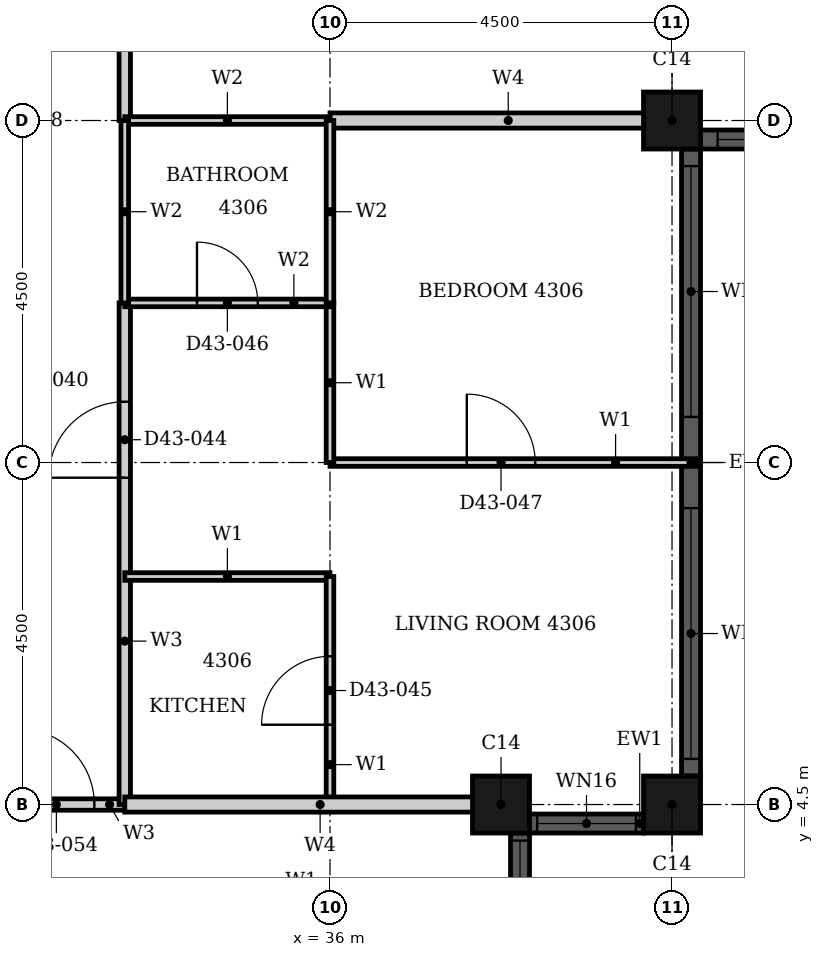
"""IFC4 building model, lengths in metres.
Left out: names, types, materials, properties, quantities, classifications, styles, units other than length and angle.
Written with IfcOpenShell. Run it as: python <this file> out.ifc"""

import sys

from ifc_helpers import new_model, si_unit, direction, frame, frame_2d, origin, origin_2d, place, context, subcontext, project, spatial, rectangle, hollow_rectangle, extrude, element, fill, save


model = new_model("IFC4")
c1 = context("Model", 3, precision=1e-05, world=origin(), true_north=direction((0.0, 1.0)))
c2 = subcontext(c1, "Body", "Model", "MODEL_VIEW")
j1 = project(units=[si_unit("LENGTHUNIT", "METRE"), si_unit("PLANEANGLEUNIT", "RADIAN")], contexts=[c1])
p1 = place(None, origin())
s1 = spatial("IfcSite", under=j1, at=p1, CompositionType="ELEMENT")
p2 = place(p1, origin())
s2 = spatial("IfcBuilding", under=s1, at=p2, CompositionType="ELEMENT")
p3 = place(p2, frame((0.0, 0.0, 172.8)))
s3 = spatial("IfcBuildingStorey", under=s2, at=p3, CompositionType="ELEMENT", Elevation=172.8)
for number, where, z_axis, x_axis in (
    (1, (38.25, 4.5, 0.0), (0.0, 0.0, 1.0), (1.0, 0.0, 0.0)),
    (2, (40.5, 4.5, 0.0), (0.0, 0.0, 1.0), (1.0, 0.0, 0.0)),
    (3, (40.5, 13.5, 0.0), (0.0, 0.0, 1.0), (1.0, 0.0, 0.0)),
):
    element("IfcColumn", number, at=place(p3, frame(where, z_axis=z_axis, x_axis=x_axis)), inside=s3, PredefinedType="COLUMN", context=c2, shape_type="SweptSolid", body=[
        extrude(hollow_rectangle(XDim=0.75, YDim=0.75, WallThickness=0.024, at=origin_2d()), origin(), (0.0, 0.0, 1.0), 3.7),
    ])
p4 = place(p3, frame((38.5, 2.625, 0.0), z_axis=(0.0, 0.0, 1.0), x_axis=(0.0, 1.0, 0.0)))
e4 = element("IfcWall", 4, at=p4, inside=s3, PredefinedType="SOLIDWALL", context=c2, shape_type="SweptSolid", body=[
    extrude(rectangle(XDim=1.5, YDim=0.25, at=frame_2d((0.75, 0.0))), origin(), (0.0, 0.0, 1.0), 3.7),
])
p5 = place(p4, frame((0.1, 0.0, 0.9)))
e5 = element("IfcOpeningElement", 5, at=p5, cuts=e4, PredefinedType="OPENING", context=c2, shape_type="SweptSolid", body=[
    extrude(rectangle(XDim=1.3, YDim=1.85, at=frame_2d((0.65, 0.925))), frame((0.0, 0.135, 0.0), z_axis=(0.0, -1.0, 0.0), x_axis=(1.0, 0.0, 0.0)), (0.0, 0.0, 1.0), 0.27),
])
p6 = place(p3, frame((38.625, 4.25, 0.0), z_axis=(0.0, 0.0, 1.0), x_axis=(1.0, 0.0, 0.0)))
e6 = element("IfcWall", 6, at=p6, inside=s3, PredefinedType="SOLIDWALL", context=c2, shape_type="SweptSolid", body=[
    extrude(rectangle(XDim=1.5, YDim=0.25, at=frame_2d((0.75, 0.0))), origin(), (0.0, 0.0, 1.0), 3.7),
])
p7 = place(p6, frame((0.1, 0.0, 0.9)))
e7 = element("IfcOpeningElement", 7, at=p7, cuts=e6, PredefinedType="OPENING", context=c2, shape_type="SweptSolid", body=[
    extrude(rectangle(XDim=1.3, YDim=1.85, at=frame_2d((0.65, 0.925))), frame((0.0, 0.135, 0.0), z_axis=(0.0, -1.0, 0.0), x_axis=(1.0, 0.0, 0.0)), (0.0, 0.0, 1.0), 0.27),
])
p8 = place(p3, frame((40.75, 4.875, 0.0), z_axis=(0.0, 0.0, 1.0), x_axis=(0.0, 1.0, 0.0)))
e8 = element("IfcWall", 8, at=p8, inside=s3, PredefinedType="SOLIDWALL", context=c2, shape_type="SweptSolid", body=[
    extrude(rectangle(XDim=8.25, YDim=0.25, at=frame_2d((4.125, 0.0))), origin(), (0.0, 0.0, 1.0), 3.7),
])
p9 = place(p8, frame((0.225, 0.0, 0.45)))
e9 = element("IfcOpeningElement", 9, at=p9, cuts=e8, PredefinedType="OPENING", context=c2, shape_type="SweptSolid", body=[
    extrude(rectangle(XDim=3.3, YDim=2.3, at=frame_2d((1.65, 1.15))), frame((0.0, 0.135, 0.0), z_axis=(0.0, -1.0, 0.0), x_axis=(1.0, 0.0, 0.0)), (0.0, 0.0, 1.0), 0.27),
])
p10 = place(p8, frame((4.725, 0.0, 0.45)))
e10 = element("IfcOpeningElement", 10, at=p10, cuts=e8, PredefinedType="OPENING", context=c2, shape_type="SweptSolid", body=[
    extrude(rectangle(XDim=3.3, YDim=2.3, at=frame_2d((1.65, 1.15))), frame((0.0, 0.135, 0.0), z_axis=(0.0, -1.0, 0.0), x_axis=(1.0, 0.0, 0.0)), (0.0, 0.0, 1.0), 0.27),
])
p11 = place(p3, frame((40.875, 13.25, 0.0), z_axis=(0.0, 0.0, 1.0), x_axis=(1.0, 0.0, 0.0)))
e11 = element("IfcWall", 11, at=p11, inside=s3, PredefinedType="SOLIDWALL", context=c2, shape_type="SweptSolid", body=[
    extrude(rectangle(XDim=3.75, YDim=0.25, at=frame_2d((1.875, 0.0))), origin(), (0.0, 0.0, 1.0), 3.7),
])
p12 = place(p11, frame((0.225, 0.0, 0.45)))
e12 = element("IfcOpeningElement", 12, at=p12, cuts=e11, PredefinedType="OPENING", context=c2, shape_type="SweptSolid", body=[
    extrude(rectangle(XDim=3.3, YDim=2.3, at=frame_2d((1.65, 1.15))), frame((0.0, 0.135, 0.0), z_axis=(0.0, -1.0, 0.0), x_axis=(1.0, 0.0, 0.0)), (0.0, 0.0, 1.0), 0.27),
])
p13 = place(p3, frame((31.5, 4.5, 0.0), z_axis=(0.0, 0.0, 1.0), x_axis=(1.0, 0.0, 0.0)))
e13 = element("IfcWall", 13, at=p13, inside=s3, PredefinedType="PARTITIONING", context=c2, shape_type="SweptSolid", body=[
    extrude(rectangle(XDim=1.8, YDim=0.15, at=frame_2d((0.9, 0.0))), origin(), (0.0, 0.0, 1.0), 3.4),
])
p14 = place(p13, frame((0.4, 0.0, 0.0)))
e14 = element("IfcOpeningElement", 14, at=p14, cuts=e13, PredefinedType="OPENING", context=c2, shape_type="SweptSolid", body=[
    extrude(rectangle(XDim=1.0, YDim=2.2, at=frame_2d((0.5, 1.1))), frame((0.0, 0.085, 0.0), z_axis=(0.0, -1.0, 0.0), x_axis=(1.0, 0.0, 0.0)), (0.0, 0.0, 1.0), 0.17),
])
p15 = place(p3, frame((33.3, 4.5, 0.0), z_axis=(0.0, 0.0, 1.0), x_axis=(0.0, 1.0, 0.0)))
e15 = element("IfcWall", 15, at=p15, inside=s3, PredefinedType="PARTITIONING", context=c2, shape_type="SweptSolid", body=[
    extrude(rectangle(XDim=6.6, YDim=0.15, at=frame_2d((3.3, 0.0))), origin(), (0.0, 0.0, 1.0), 3.4),
])
p16 = place(p15, frame((4.3, 0.0, 0.0)))
e16 = element("IfcOpeningElement", 16, at=p16, cuts=e15, PredefinedType="OPENING", context=c2, shape_type="SweptSolid", body=[
    extrude(rectangle(XDim=1.0, YDim=2.2, at=frame_2d((0.5, 1.1))), frame((0.0, 0.085, 0.0), z_axis=(0.0, -1.0, 0.0), x_axis=(1.0, 0.0, 0.0)), (0.0, 0.0, 1.0), 0.17),
])
p17 = place(p3, frame((33.3, 13.501, 0.0), z_axis=(0.0, 0.0, 1.0), x_axis=(0.0, 1.0, 0.0)))
e17 = element("IfcWall", 17, at=p17, inside=s3, PredefinedType="PARTITIONING", context=c2, shape_type="SweptSolid", body=[
    extrude(rectangle(XDim=7.198, YDim=0.15, at=frame_2d((3.599, 0.0))), origin(), (0.0, 0.0, 1.0), 3.4),
])
p18 = place(p17, frame((3.099, 0.0, 0.0)))
e18 = element("IfcOpeningElement", 18, at=p18, cuts=e17, PredefinedType="OPENING", context=c2, shape_type="SweptSolid", body=[
    extrude(rectangle(XDim=1.0, YDim=2.2, at=frame_2d((0.5, 1.1))), frame((0.0, 0.085, 0.0), z_axis=(0.0, -1.0, 0.0), x_axis=(1.0, 0.0, 0.0)), (0.0, 0.0, 1.0), 0.17),
])
p19 = place(p3, frame((33.3, 7.5, 0.0), z_axis=(0.0, 0.0, 1.0), x_axis=(1.0, 0.0, 0.0)))
e19 = element("IfcWall", 19, at=p19, inside=s3, PredefinedType="PARTITIONING", context=c2, shape_type="SweptSolid", body=[
    extrude(rectangle(XDim=2.7, YDim=0.1, at=frame_2d((1.35, 0.0))), origin(), (0.0, 0.0, 1.0), 3.4),
])
p20 = place(p3, frame((36.0, 9.0, 0.0), z_axis=(0.0, 0.0, 1.0), x_axis=(1.0, 0.0, 0.0)))
e20 = element("IfcWall", 20, at=p20, inside=s3, PredefinedType="PARTITIONING", context=c2, shape_type="SweptSolid", body=[
    extrude(rectangle(XDim=4.815, YDim=0.1, at=frame_2d((2.407, 0.0))), origin(), (0.0, 0.0, 1.0), 3.4),
])
p21 = place(p20, frame((1.8, 0.0, 0.0)))
e21 = element("IfcOpeningElement", 21, at=p21, cuts=e20, PredefinedType="OPENING", context=c2, shape_type="SweptSolid", body=[
    extrude(rectangle(XDim=0.9, YDim=2.1, at=frame_2d((0.45, 1.05))), frame((0.0, 0.06, 0.0), z_axis=(0.0, -1.0, 0.0), x_axis=(1.0, 0.0, 0.0)), (0.0, 0.0, 1.0), 0.12),
])
p22 = place(p3, frame((36.0, 9.0, 0.0), z_axis=(0.0, 0.0, 1.0), x_axis=(0.0, 1.0, 0.0)))
e22 = element("IfcWall", 22, at=p22, inside=s3, PredefinedType="PARTITIONING", context=c2, shape_type="SweptSolid", body=[
    extrude(rectangle(XDim=2.1, YDim=0.1, at=frame_2d((1.05, 0.0))), origin(), (0.0, 0.0, 1.0), 2.68),
])
p23 = place(p3, frame((36.0, 4.5, 0.0), z_axis=(0.0, 0.0, 1.0), x_axis=(0.0, 1.0, 0.0)))
e23 = element("IfcWall", 23, at=p23, inside=s3, PredefinedType="PARTITIONING", context=c2, shape_type="SweptSolid", body=[
    extrude(rectangle(XDim=3.0, YDim=0.1, at=frame_2d((1.5, 0.0))), origin(), (0.0, 0.0, 1.0), 2.68),
])
p24 = place(p23, frame((1.05, 0.0, 0.0)))
e24 = element("IfcOpeningElement", 24, at=p24, cuts=e23, PredefinedType="OPENING", context=c2, shape_type="SweptSolid", body=[
    extrude(rectangle(XDim=0.9, YDim=2.1, at=frame_2d((0.45, 1.05))), frame((0.0, 0.06, 0.0), z_axis=(0.0, -1.0, 0.0), x_axis=(1.0, 0.0, 0.0)), (0.0, 0.0, 1.0), 0.12),
])
p25 = place(p3, frame((36.0, 13.5, 0.0), z_axis=(0.0, 0.0, 1.0), x_axis=(1.0, 0.0, 0.0)))
e25 = element("IfcWall", 25, at=p25, inside=s3, PredefinedType="PARTITIONING", context=c2, shape_type="SweptSolid", body=[
    extrude(rectangle(XDim=4.69, YDim=0.2, at=frame_2d((2.345, 0.0))), origin(), (0.0, 0.0, 1.0), 2.48),
])
p26 = place(p3, frame((33.3, 4.5, 0.0), z_axis=(0.0, 0.0, 1.0), x_axis=(1.0, 0.0, 0.0)))
e26 = element("IfcWall", 26, at=p26, inside=s3, PredefinedType="PARTITIONING", context=c2, shape_type="SweptSolid", body=[
    extrude(rectangle(XDim=5.14, YDim=0.2, at=frame_2d((2.57, 0.0))), origin(), (0.0, 0.0, 1.0), 3.4),
])
p27 = place(p3, frame((33.3, 11.1, 0.0), z_axis=(0.0, 0.0, 1.0), x_axis=(1.0, 0.0, 0.0)))
e27 = element("IfcWall", 27, at=p27, inside=s3, PredefinedType="PARTITIONING", context=c2, shape_type="SweptSolid", body=[
    extrude(rectangle(XDim=2.7, YDim=0.1, at=frame_2d((1.35, 0.0))), origin(), (0.0, 0.0, 1.0), 3.4),
])
p28 = place(p27, frame((0.95, 0.0, 0.0)))
e28 = element("IfcOpeningElement", 28, at=p28, cuts=e27, PredefinedType="OPENING", context=c2, shape_type="SweptSolid", body=[
    extrude(rectangle(XDim=0.8, YDim=2.1, at=frame_2d((0.4, 1.05))), frame((0.0, 0.06, 0.0), z_axis=(0.0, -1.0, 0.0), x_axis=(1.0, 0.0, 0.0)), (0.0, 0.0, 1.0), 0.12),
])
p29 = place(p3, frame((33.301, 13.5, 0.0), z_axis=(0.0, 0.0, 1.0), x_axis=(1.0, 0.0, 0.0)))
e29 = element("IfcWall", 29, at=p29, inside=s3, PredefinedType="PARTITIONING", context=c2, shape_type="SweptSolid", body=[
    extrude(rectangle(XDim=2.698, YDim=0.1, at=frame_2d((1.349, 0.0))), origin(), (0.0, 0.0, 1.0), 2.48),
])
p30 = place(p3, frame((33.3, 11.1, 0.0), z_axis=(0.0, 0.0, 1.0), x_axis=(0.0, 1.0, 0.0)))
e30 = element("IfcWall", 30, at=p30, inside=s3, PredefinedType="PARTITIONING", context=c2, shape_type="SweptSolid", body=[
    extrude(rectangle(XDim=2.4, YDim=0.1, at=frame_2d((1.2, 0.0))), origin(), (0.0, 0.0, 1.0), 3.4),
])
p31 = place(p3, frame((36.0, 11.1, 0.0), z_axis=(0.0, 0.0, 1.0), x_axis=(0.0, 1.0, 0.0)))
e31 = element("IfcWall", 31, at=p31, inside=s3, PredefinedType="PARTITIONING", context=c2, shape_type="SweptSolid", body=[
    extrude(rectangle(XDim=2.4, YDim=0.1, at=frame_2d((1.2, 0.0))), origin(), (0.0, 0.0, 1.0), 2.68),
])
p32 = place(p5, origin())
e32 = element("IfcWindow", 32, at=p32, inside=s3, PartitioningType="SINGLE_PANEL", PredefinedType="WINDOW", context=c2, shape_type="SweptSolid", body=[
    extrude(rectangle(XDim=1.3, YDim=1.85, at=frame_2d((0.65, 0.925))), frame((0.0, 0.03, 0.0), z_axis=(0.0, -1.0, 0.0), x_axis=(1.0, 0.0, 0.0)), (0.0, 0.0, 1.0), 0.06),
])
fill(e5, e32)
p33 = place(p7, origin())
e33 = element("IfcWindow", 33, at=p33, inside=s3, PartitioningType="SINGLE_PANEL", PredefinedType="WINDOW", context=c2, shape_type="SweptSolid", body=[
    extrude(rectangle(XDim=1.3, YDim=1.85, at=frame_2d((0.65, 0.925))), frame((0.0, 0.03, 0.0), z_axis=(0.0, -1.0, 0.0), x_axis=(1.0, 0.0, 0.0)), (0.0, 0.0, 1.0), 0.06),
])
fill(e7, e33)
p34 = place(p9, origin())
e34 = element("IfcWindow", 34, at=p34, inside=s3, PartitioningType="SINGLE_PANEL", PredefinedType="WINDOW", context=c2, shape_type="SweptSolid", body=[
    extrude(rectangle(XDim=3.3, YDim=2.3, at=frame_2d((1.65, 1.15))), frame((0.0, 0.03, 0.0), z_axis=(0.0, -1.0, 0.0), x_axis=(1.0, 0.0, 0.0)), (0.0, 0.0, 1.0), 0.06),
])
fill(e9, e34)
p35 = place(p10, origin())
e35 = element("IfcWindow", 35, at=p35, inside=s3, PartitioningType="SINGLE_PANEL", PredefinedType="WINDOW", context=c2, shape_type="SweptSolid", body=[
    extrude(rectangle(XDim=3.3, YDim=2.3, at=frame_2d((1.65, 1.15))), frame((0.0, 0.03, 0.0), z_axis=(0.0, -1.0, 0.0), x_axis=(1.0, 0.0, 0.0)), (0.0, 0.0, 1.0), 0.06),
])
fill(e10, e35)
p36 = place(p12, origin())
e36 = element("IfcWindow", 36, at=p36, inside=s3, PartitioningType="SINGLE_PANEL", PredefinedType="WINDOW", context=c2, shape_type="SweptSolid", body=[
    extrude(rectangle(XDim=3.3, YDim=2.3, at=frame_2d((1.65, 1.15))), frame((0.0, 0.03, 0.0), z_axis=(0.0, -1.0, 0.0), x_axis=(1.0, 0.0, 0.0)), (0.0, 0.0, 1.0), 0.06),
])
fill(e12, e36)
p37 = place(p16, origin())
e37 = element("IfcDoor", 37, at=p37, inside=s3, OperationType="SINGLE_SWING_LEFT", PredefinedType="DOOR", context=c2, shape_type="SweptSolid", body=[
    extrude(rectangle(XDim=1.0, YDim=2.2, at=frame_2d((0.5, 1.1))), frame((0.0, 0.025, 0.0), z_axis=(0.0, -1.0, 0.0), x_axis=(1.0, 0.0, 0.0)), (0.0, 0.0, 1.0), 0.05),
])
fill(e16, e37)
p38 = place(p24, origin())
e38 = element("IfcDoor", 38, at=p38, inside=s3, OperationType="SINGLE_SWING_RIGHT", PredefinedType="DOOR", context=c2, shape_type="SweptSolid", body=[
    extrude(rectangle(XDim=0.9, YDim=2.1, at=frame_2d((0.45, 1.05))), frame((0.0, 0.025, 0.0), z_axis=(0.0, -1.0, 0.0), x_axis=(1.0, 0.0, 0.0)), (0.0, 0.0, 1.0), 0.05),
])
fill(e24, e38)
p39 = place(p28, origin())
e39 = element("IfcDoor", 39, at=p39, inside=s3, OperationType="SINGLE_SWING_LEFT", PredefinedType="DOOR", context=c2, shape_type="SweptSolid", body=[
    extrude(rectangle(XDim=0.8, YDim=2.1, at=frame_2d((0.4, 1.05))), frame((0.0, 0.025, 0.0), z_axis=(0.0, -1.0, 0.0), x_axis=(1.0, 0.0, 0.0)), (0.0, 0.0, 1.0), 0.05),
])
fill(e28, e39)
p40 = place(p21, origin())
e40 = element("IfcDoor", 40, at=p40, inside=s3, OperationType="SINGLE_SWING_LEFT", PredefinedType="DOOR", context=c2, shape_type="SweptSolid", body=[
    extrude(rectangle(XDim=0.9, YDim=2.1, at=frame_2d((0.45, 1.05))), frame((0.0, 0.025, 0.0), z_axis=(0.0, -1.0, 0.0), x_axis=(1.0, 0.0, 0.0)), (0.0, 0.0, 1.0), 0.05),
])
fill(e21, e40)
p41 = place(p14, origin())
e41 = element("IfcDoor", 41, at=p41, inside=s3, OperationType="SINGLE_SWING_LEFT", PredefinedType="DOOR", context=c2, shape_type="SweptSolid", body=[
    extrude(rectangle(XDim=1.0, YDim=2.2, at=frame_2d((0.5, 1.1))), frame((0.0, 0.025, 0.0), z_axis=(0.0, -1.0, 0.0), x_axis=(1.0, 0.0, 0.0)), (0.0, 0.0, 1.0), 0.05),
])
fill(e14, e41)
save(model, sys.argv[1])
